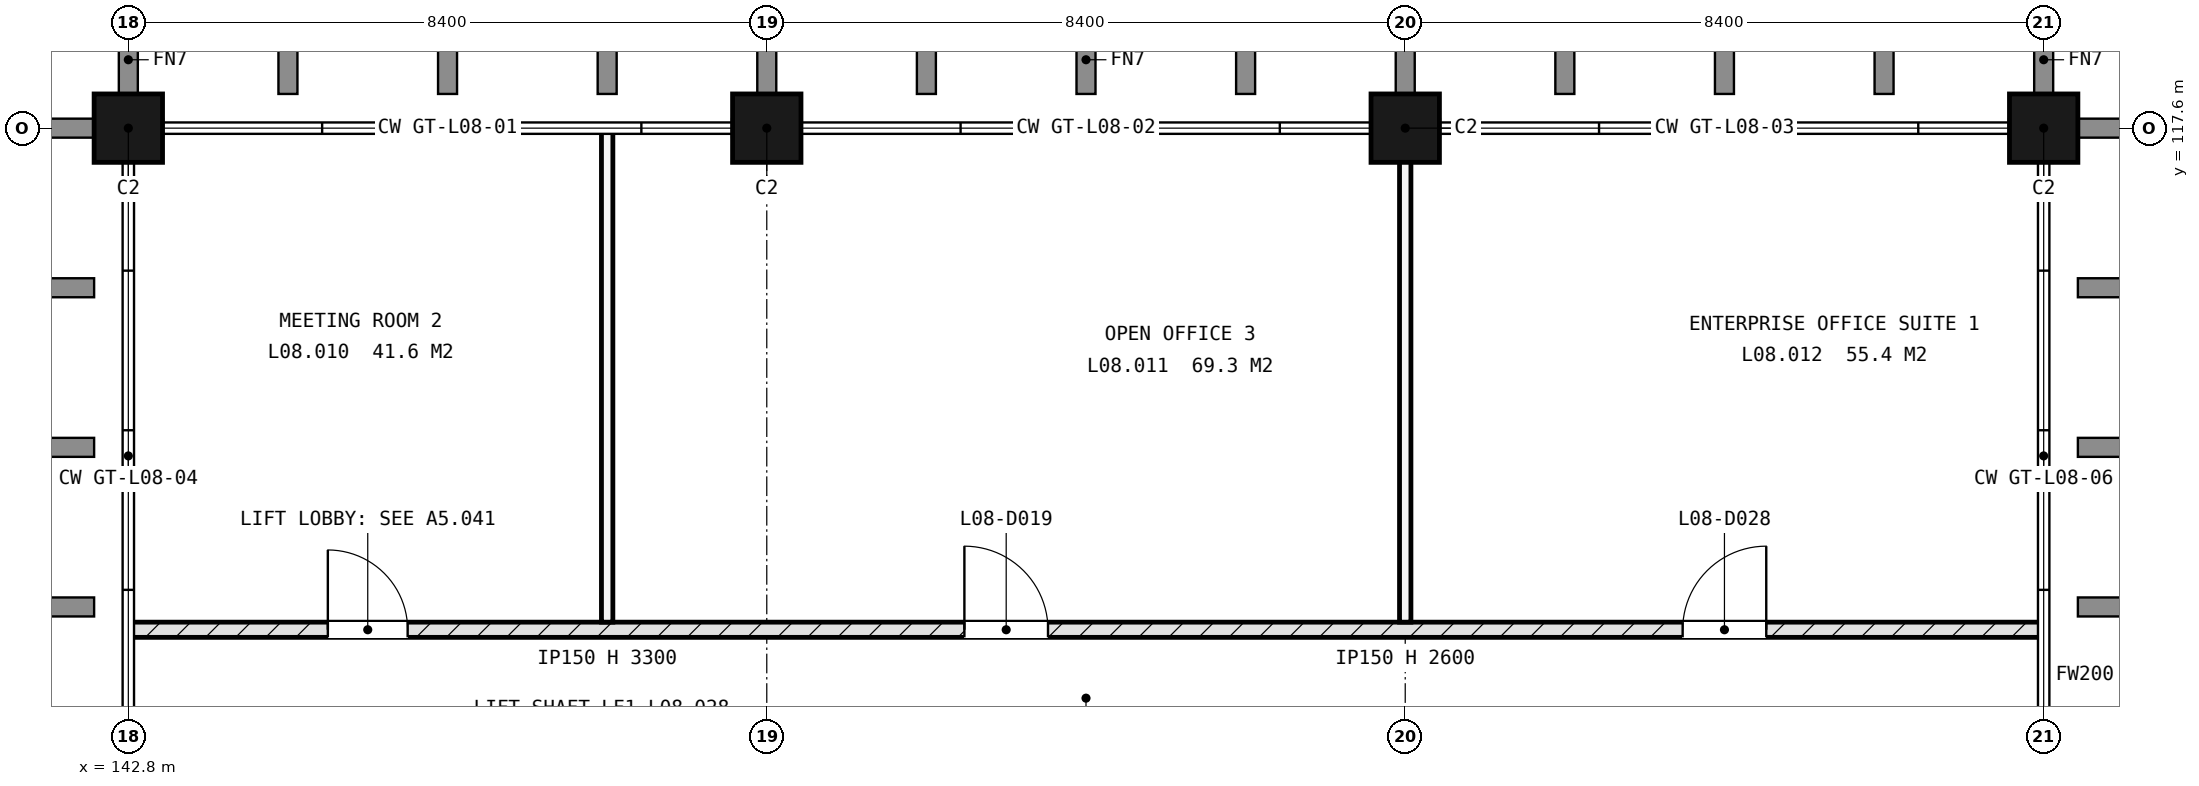
"""IFC4 building model, lengths in metres.
Left out: names, types, materials, properties, quantities, classifications, styles, units other than length and angle.
Written with IfcOpenShell. Run it as: python <this file> out.ifc"""

import sys

from ifc_helpers import new_model, si_unit, direction, frame, frame_2d, origin, origin_2d, place, context, subcontext, project, spatial, rectangle, extrude, element, fill, save


model = new_model("IFC4")
c1 = context("Model", 3, precision=1e-05, world=origin(), true_north=direction((0.0, 1.0)))
c2 = subcontext(c1, "Body", "Model", "MODEL_VIEW")
j1 = project(units=[si_unit("LENGTHUNIT", "METRE"), si_unit("PLANEANGLEUNIT", "RADIAN")], contexts=[c1])
p1 = place(None, origin())
s1 = spatial("IfcSite", under=j1, at=p1, CompositionType="ELEMENT")
p2 = place(p1, origin())
s2 = spatial("IfcBuilding", under=s1, at=p2, CompositionType="ELEMENT")
p3 = place(p2, frame((0.0, 0.0, 32.4)))
s3 = spatial("IfcBuildingStorey", under=s2, at=p3, CompositionType="ELEMENT", Elevation=32.4)
for number, where, z_axis, x_axis in (
    (1, (142.8, 117.6, -0.25), (0.0, 0.0, 1.0), (1.0, 0.0, 0.0)),
    (2, (151.2, 117.6, -0.25), (0.0, 0.0, 1.0), (1.0, 0.0, 0.0)),
    (3, (159.6, 117.6, -0.25), (0.0, 0.0, 1.0), (1.0, 0.0, 0.0)),
    (4, (168.0, 117.6, -0.25), (0.0, 0.0, 1.0), (1.0, 0.0, 0.0)),
):
    element("IfcColumn", number, at=place(p3, frame(where, z_axis=z_axis, x_axis=x_axis)), inside=s3, PredefinedType="COLUMN", context=c2, shape_type="SweptSolid", body=[
        extrude(rectangle(XDim=0.9, YDim=0.9, at=origin_2d()), origin(), (0.0, 0.0, 1.0), 3.6),
    ])
p4 = place(p3, frame((142.8, 111.0, 0.0), z_axis=(0.0, 0.0, 1.0), x_axis=(1.0, 0.0, 0.0)))
e5 = element("IfcWall", 5, at=p4, inside=s3, PredefinedType="SOLIDWALL", context=c2, shape_type="SweptSolid", body=[
    extrude(rectangle(XDim=25.2, YDim=0.2, at=frame_2d((12.6, 0.0))), origin(), (0.0, 0.0, 1.0), 3.3),
])
p5 = place(p4, frame((2.625, 0.0, 0.0)))
e6 = element("IfcOpeningElement", 6, at=p5, cuts=e5, PredefinedType="OPENING", context=c2, shape_type="SweptSolid", body=[
    extrude(rectangle(XDim=1.05, YDim=2.1, at=frame_2d((0.525, 1.05))), frame((0.0, 0.11, 0.0), z_axis=(0.0, -1.0, 0.0), x_axis=(1.0, 0.0, 0.0)), (0.0, 0.0, 1.0), 0.22),
])
p6 = place(p4, frame((11.0, 0.0, 0.0)))
e7 = element("IfcOpeningElement", 7, at=p6, cuts=e5, PredefinedType="OPENING", context=c2, shape_type="SweptSolid", body=[
    extrude(rectangle(XDim=1.1, YDim=2.25, at=frame_2d((0.55, 1.125))), frame((0.0, 0.11, 0.0), z_axis=(0.0, -1.0, 0.0), x_axis=(1.0, 0.0, 0.0)), (0.0, 0.0, 1.0), 0.22),
])
p7 = place(p4, frame((20.45, 0.0, 0.0)))
e8 = element("IfcOpeningElement", 8, at=p7, cuts=e5, PredefinedType="OPENING", context=c2, shape_type="SweptSolid", body=[
    extrude(rectangle(XDim=1.1, YDim=2.25, at=frame_2d((0.55, 1.125))), frame((0.0, 0.11, 0.0), z_axis=(0.0, -1.0, 0.0), x_axis=(1.0, 0.0, 0.0)), (0.0, 0.0, 1.0), 0.22),
])
p8 = place(p3, frame((149.1, 111.1, 0.0), z_axis=(0.0, 0.0, 1.0), x_axis=(0.0, 1.0, 0.0)))
e9 = element("IfcWall", 9, at=p8, inside=s3, PredefinedType="PARTITIONING", context=c2, shape_type="SweptSolid", body=[
    extrude(rectangle(XDim=6.5, YDim=0.15, at=frame_2d((3.25, 0.0))), origin(), (0.0, 0.0, 1.0), 3.3),
])
p9 = place(p3, frame((159.6, 111.1, 0.0), z_axis=(0.0, 0.0, 1.0), x_axis=(0.0, 1.0, 0.0)))
e10 = element("IfcWall", 10, at=p9, inside=s3, PredefinedType="PARTITIONING", context=c2, shape_type="SweptSolid", body=[
    extrude(rectangle(XDim=6.5, YDim=0.15, at=frame_2d((3.25, 0.0))), origin(), (0.0, 0.0, 1.0), 2.6),
])
p10 = place(p5, origin())
e11 = element("IfcDoor", 11, at=p10, inside=s3, OperationType="SINGLE_SWING_RIGHT", PredefinedType="DOOR", context=c2, shape_type="SweptSolid", body=[
    extrude(rectangle(XDim=1.05, YDim=2.1, at=frame_2d((0.525, 1.05))), frame((0.0, 0.025, 0.0), z_axis=(0.0, -1.0, 0.0), x_axis=(1.0, 0.0, 0.0)), (0.0, 0.0, 1.0), 0.05),
])
fill(e6, e11)
p11 = place(p6, origin())
e12 = element("IfcDoor", 12, at=p11, inside=s3, OperationType="SINGLE_SWING_RIGHT", PredefinedType="DOOR", context=c2, shape_type="SweptSolid", body=[
    extrude(rectangle(XDim=1.1, YDim=2.25, at=frame_2d((0.55, 1.125))), frame((0.0, 0.025, 0.0), z_axis=(0.0, -1.0, 0.0), x_axis=(1.0, 0.0, 0.0)), (0.0, 0.0, 1.0), 0.05),
])
fill(e7, e12)
p12 = place(p7, origin())
e13 = element("IfcDoor", 13, at=p12, inside=s3, OperationType="SINGLE_SWING_LEFT", PredefinedType="DOOR", context=c2, shape_type="SweptSolid", body=[
    extrude(rectangle(XDim=1.1, YDim=2.25, at=frame_2d((0.55, 1.125))), frame((0.0, 0.025, 0.0), z_axis=(0.0, -1.0, 0.0), x_axis=(1.0, 0.0, 0.0)), (0.0, 0.0, 1.0), 0.05),
])
fill(e8, e13)
save(model, sys.argv[1])
